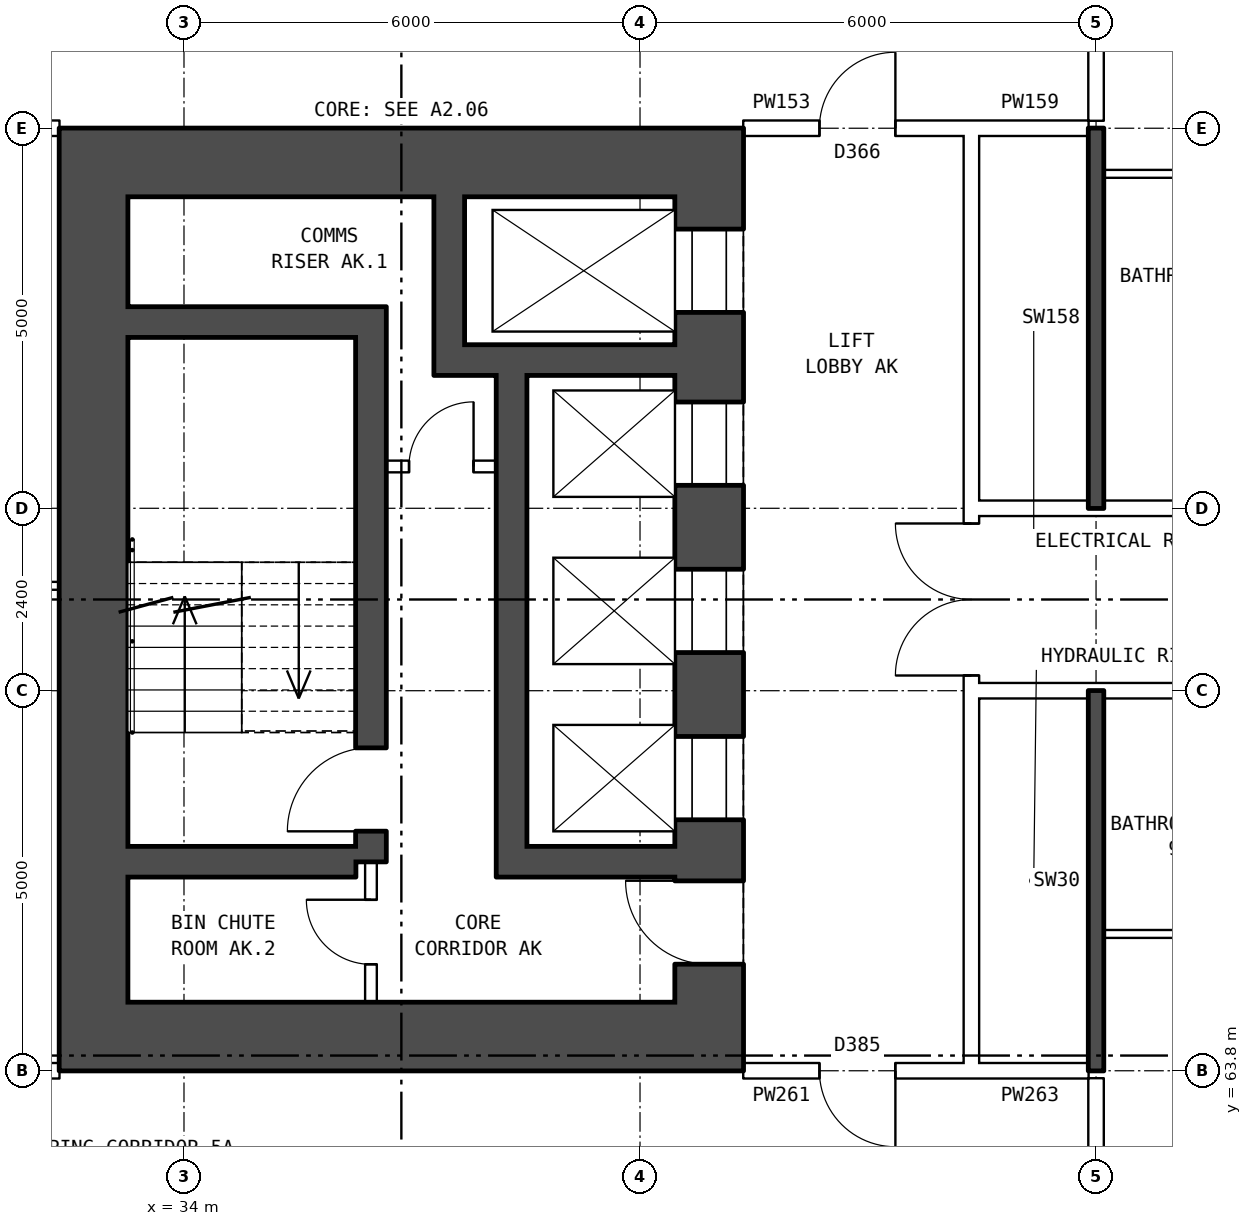
"""IFC4 building model, lengths in metres.
Left out: names, types, materials, properties, quantities, classifications, styles, units other than length and angle.
Written with IfcOpenShell. Run it as: python <this file> out.ifc"""

import sys

from ifc_helpers import new_model, si_unit, direction, frame, frame_2d, origin, place, context, subcontext, project, spatial, rectangle, extrude, element, fill, save


model = new_model("IFC4")
c1 = context("Model", 3, precision=1e-05, world=origin(), true_north=direction((0.0, 1.0)))
c2 = subcontext(c1, "Body", "Model", "MODEL_VIEW")
j1 = project(units=[si_unit("LENGTHUNIT", "METRE"), si_unit("PLANEANGLEUNIT", "RADIAN")], contexts=[c1])
p1 = place(None, origin())
s1 = spatial("IfcSite", under=j1, at=p1, CompositionType="ELEMENT")
p2 = place(p1, origin())
s2 = spatial("IfcBuilding", under=s1, at=p2, CompositionType="ELEMENT")
p3 = place(p2, frame((0.0, 0.0, 22.6)))
s3 = spatial("IfcBuildingStorey", under=s2, at=p3, CompositionType="ELEMENT", Elevation=22.6)
p4 = place(p3, frame((40.91, 75.3, 0.0), z_axis=(0.0, 0.0, 1.0), x_axis=(0.0, -1.0, 0.0)))
e1 = element("IfcWall", 1, at=p4, inside=s3, PredefinedType="SHEAR", context=c2, shape_type="SweptSolid", body=[
    extrude(rectangle(XDim=10.6, YDim=0.9, at=frame_2d((5.3, 0.0))), origin(), (0.0, 0.0, 1.0), 2.85),
])
p5 = place(p4, frame((0.425, 0.0, 0.0)))
e2 = element("IfcOpeningElement", 2, at=p5, cuts=e1, PredefinedType="OPENING", context=c2, shape_type="SweptSolid", body=[
    extrude(rectangle(XDim=1.1, YDim=2.1, at=frame_2d((0.55, 1.05))), frame((0.0, 0.46, 0.0), z_axis=(0.0, -1.0, 0.0), x_axis=(1.0, 0.0, 0.0)), (0.0, 0.0, 1.0), 0.92),
])
p6 = place(p4, frame((2.7, 0.0, 0.0)))
e3 = element("IfcOpeningElement", 3, at=p6, cuts=e1, PredefinedType="OPENING", context=c2, shape_type="SweptSolid", body=[
    extrude(rectangle(XDim=1.1, YDim=2.1, at=frame_2d((0.55, 1.05))), frame((0.0, 0.46, 0.0), z_axis=(0.0, -1.0, 0.0), x_axis=(1.0, 0.0, 0.0)), (0.0, 0.0, 1.0), 0.92),
])
p7 = place(p4, frame((4.9, 0.0, 0.0)))
e4 = element("IfcOpeningElement", 4, at=p7, cuts=e1, PredefinedType="OPENING", context=c2, shape_type="SweptSolid", body=[
    extrude(rectangle(XDim=1.1, YDim=2.1, at=frame_2d((0.55, 1.05))), frame((0.0, 0.46, 0.0), z_axis=(0.0, -1.0, 0.0), x_axis=(1.0, 0.0, 0.0)), (0.0, 0.0, 1.0), 0.92),
])
p8 = place(p4, frame((7.1, 0.0, 0.0)))
e5 = element("IfcOpeningElement", 5, at=p8, cuts=e1, PredefinedType="OPENING", context=c2, shape_type="SweptSolid", body=[
    extrude(rectangle(XDim=1.1, YDim=2.1, at=frame_2d((0.55, 1.05))), frame((0.0, 0.46, 0.0), z_axis=(0.0, -1.0, 0.0), x_axis=(1.0, 0.0, 0.0)), (0.0, 0.0, 1.0), 0.92),
])
p9 = place(p4, frame((9.0, 0.0, 0.0)))
e6 = element("IfcOpeningElement", 6, at=p9, cuts=e1, PredefinedType="OPENING", context=c2, shape_type="SweptSolid", body=[
    extrude(rectangle(XDim=1.1, YDim=2.1, at=frame_2d((0.55, 1.05))), frame((0.0, 0.46, 0.0), z_axis=(0.0, -1.0, 0.0), x_axis=(1.0, 0.0, 0.0)), (0.0, 0.0, 1.0), 0.92),
])
p10 = place(p3, frame((32.81, 75.3, 0.0), z_axis=(0.0, 0.0, 1.0), x_axis=(0.0, -1.0, 0.0)))
e7 = element("IfcWall", 7, at=p10, inside=s3, PredefinedType="SHEAR", context=c2, shape_type="SweptSolid", body=[
    extrude(rectangle(XDim=10.6, YDim=0.9, at=frame_2d((5.3, 0.0))), origin(), (0.0, 0.0, 1.0), 2.85),
])
for number, where, z_axis, x_axis in (
    (8, (41.36, 75.75, 0.0), (0.0, 0.0, 1.0), (-1.0, 0.0, 0.0)),
    (9, (41.36, 64.25, 0.0), (0.0, 0.0, 1.0), (-1.0, 0.0, 0.0)),
):
    element("IfcWall", number, at=place(p3, frame(where, z_axis=z_axis, x_axis=x_axis)), inside=s3, PredefinedType="SHEAR", context=c2, shape_type="SweptSolid", body=[
        extrude(rectangle(XDim=9.0, YDim=0.9, at=frame_2d((4.5, 0.0))), origin(), (0.0, 0.0, 1.0), 2.85),
    ])
p11 = place(p3, frame((36.26, 73.65, 0.0), z_axis=(0.0, 0.0, 1.0), x_axis=(-1.0, 0.0, 0.0)))
e10 = element("IfcWall", 10, at=p11, inside=s3, PredefinedType="SHEAR", context=c2, shape_type="SweptSolid", body=[
    extrude(rectangle(XDim=3.0, YDim=0.4, at=frame_2d((1.5, 0.0))), origin(), (0.0, 0.0, 1.0), 2.85),
])
p12 = place(p3, frame((40.46, 73.15, 0.0), z_axis=(0.0, 0.0, 1.0), x_axis=(-1.0, 0.0, 0.0)))
e11 = element("IfcWall", 11, at=p12, inside=s3, PredefinedType="SHEAR", context=c2, shape_type="SweptSolid", body=[
    extrude(rectangle(XDim=3.17, YDim=0.4, at=frame_2d((1.585, 0.0))), origin(), (0.0, 0.0, 1.0), 2.85),
])
p13 = place(p3, frame((38.11, 71.75, 0.0), z_axis=(0.0, 0.0, 1.0), x_axis=(-1.0, 0.0, 0.0)))
e12 = element("IfcWall", 12, at=p13, inside=s3, PredefinedType="PARTITIONING", context=c2, shape_type="SweptSolid", body=[
    extrude(rectangle(XDim=1.45, YDim=0.15, at=frame_2d((0.725, 0.0))), origin(), (0.0, 0.0, 1.0), 2.85),
])
p14 = place(p13, frame((0.3, 0.0, 0.0)))
e13 = element("IfcOpeningElement", 13, at=p14, cuts=e12, PredefinedType="OPENING", context=c2, shape_type="SweptSolid", body=[
    extrude(rectangle(XDim=0.85, YDim=2.1, at=frame_2d((0.425, 1.05))), frame((0.0, 0.085, 0.0), z_axis=(0.0, -1.0, 0.0), x_axis=(1.0, 0.0, 0.0)), (0.0, 0.0, 1.0), 0.17),
])
p15 = place(p3, frame((40.46, 66.55, 0.0), z_axis=(0.0, 0.0, 1.0), x_axis=(-1.0, 0.0, 0.0)))
e14 = element("IfcWall", 14, at=p15, inside=s3, PredefinedType="SHEAR", context=c2, shape_type="SweptSolid", body=[
    extrude(rectangle(XDim=1.95, YDim=0.4, at=frame_2d((0.975, 0.0))), origin(), (0.0, 0.0, 1.0), 2.85),
])
p16 = place(p3, frame((36.26, 66.55, 0.0), z_axis=(0.0, 0.0, 1.0), x_axis=(-1.0, 0.0, 0.0)))
e15 = element("IfcWall", 15, at=p16, inside=s3, PredefinedType="SHEAR", context=c2, shape_type="SweptSolid", body=[
    extrude(rectangle(XDim=3.0, YDim=0.4, at=frame_2d((1.5, 0.0))), origin(), (0.0, 0.0, 1.0), 2.85),
])
p17 = place(p3, frame((38.31, 72.95, 0.0), z_axis=(0.0, 0.0, 1.0), x_axis=(0.0, -1.0, 0.0)))
e16 = element("IfcWall", 16, at=p17, inside=s3, PredefinedType="SHEAR", context=c2, shape_type="SweptSolid", body=[
    extrude(rectangle(XDim=6.6, YDim=0.4, at=frame_2d((3.3, 0.0))), origin(), (0.0, 0.0, 1.0), 2.85),
])
p18 = place(p3, frame((37.49, 75.3, 0.0), z_axis=(0.0, 0.0, 1.0), x_axis=(0.0, -1.0, 0.0)))
e17 = element("IfcWall", 17, at=p18, inside=s3, PredefinedType="SHEAR", context=c2, shape_type="SweptSolid", body=[
    extrude(rectangle(XDim=1.95, YDim=0.4, at=frame_2d((0.975, 0.0))), origin(), (0.0, 0.0, 1.0), 2.85),
])
p19 = place(p3, frame((36.46, 73.85, 0.0), z_axis=(0.0, 0.0, 1.0), x_axis=(0.0, -1.0, 0.0)))
e18 = element("IfcWall", 18, at=p19, inside=s3, PredefinedType="SHEAR", context=c2, shape_type="SweptSolid", body=[
    extrude(rectangle(XDim=7.3, YDim=0.4, at=frame_2d((3.65, 0.0))), origin(), (0.0, 0.0, 1.0), 2.85),
])
p20 = place(p19, frame((5.8, 0.0, 0.0)))
e19 = element("IfcOpeningElement", 19, at=p20, cuts=e18, PredefinedType="OPENING", context=c2, shape_type="SweptSolid", body=[
    extrude(rectangle(XDim=1.1, YDim=2.1, at=frame_2d((0.55, 1.05))), frame((0.0, 0.21, 0.0), z_axis=(0.0, -1.0, 0.0), x_axis=(1.0, 0.0, 0.0)), (0.0, 0.0, 1.0), 0.42),
])
p21 = place(p3, frame((36.46, 66.55, 0.0), z_axis=(0.0, 0.0, 1.0), x_axis=(0.0, -1.0, 0.0)))
e20 = element("IfcWall", 20, at=p21, inside=s3, PredefinedType="PARTITIONING", context=c2, shape_type="SweptSolid", body=[
    extrude(rectangle(XDim=1.85, YDim=0.15, at=frame_2d((0.925, 0.0))), origin(), (0.0, 0.0, 1.0), 2.85),
])
p22 = place(p21, frame((0.5, 0.0, 0.0)))
e21 = element("IfcOpeningElement", 21, at=p22, cuts=e20, PredefinedType="OPENING", context=c2, shape_type="SweptSolid", body=[
    extrude(rectangle(XDim=0.85, YDim=2.1, at=frame_2d((0.425, 1.05))), frame((0.0, 0.085, 0.0), z_axis=(0.0, -1.0, 0.0), x_axis=(1.0, 0.0, 0.0)), (0.0, 0.0, 1.0), 0.17),
])
p23 = place(p3, frame((44.36, 63.9, 0.0), z_axis=(0.0, 0.0, 1.0), x_axis=(0.0, 1.0, 0.0)))
e22 = element("IfcWall", 22, at=p23, inside=s3, PredefinedType="PARTITIONING", context=c2, shape_type="SweptSolid", body=[
    extrude(rectangle(XDim=12.2, YDim=0.2, at=frame_2d((6.1, 0.0))), origin(), (0.0, 0.0, 1.0), 2.85),
])
p24 = place(p23, frame((5.1, 0.0, 0.0)))
e23 = element("IfcOpeningElement", 23, at=p24, cuts=e22, PredefinedType="OPENING", context=c2, shape_type="SweptSolid", body=[
    extrude(rectangle(XDim=2.0, YDim=2.1, at=frame_2d((1.0, 1.05))), frame((0.0, 0.11, 0.0), z_axis=(0.0, -1.0, 0.0), x_axis=(1.0, 0.0, 0.0)), (0.0, 0.0, 1.0), 0.22),
])
p25 = place(p3, frame((22.51, 63.8, 0.0), z_axis=(0.0, 0.0, 1.0), x_axis=(1.0, 0.0, 0.0)))
e24 = element("IfcWall", 24, at=p25, inside=s3, PredefinedType="PARTITIONING", context=c2, shape_type="SweptSolid", body=[
    extrude(rectangle(XDim=9.85, YDim=0.2, at=frame_2d((4.925, 0.0))), origin(), (0.0, 0.0, 1.0), 2.85),
])
p26 = place(p25, frame((7.27, 0.0, 0.0)))
e25 = element("IfcOpeningElement", 25, at=p26, cuts=e24, PredefinedType="OPENING", context=c2, shape_type="SweptSolid", body=[
    extrude(rectangle(XDim=0.8, YDim=2.1, at=frame_2d((0.4, 1.05))), frame((0.0, 0.11, 0.0), z_axis=(0.0, -1.0, 0.0), x_axis=(1.0, 0.0, 0.0)), (0.0, 0.0, 1.0), 0.22),
])
p27 = place(p3, frame((41.36, 63.8, 0.0), z_axis=(0.0, 0.0, 1.0), x_axis=(1.0, 0.0, 0.0)))
e26 = element("IfcWall", 26, at=p27, inside=s3, PredefinedType="PARTITIONING", context=c2, shape_type="SweptSolid", body=[
    extrude(rectangle(XDim=3.0, YDim=0.2, at=frame_2d((1.5, 0.0))), origin(), (0.0, 0.0, 1.0), 2.85),
])
p28 = place(p27, frame((1.0, 0.0, 0.0)))
e27 = element("IfcOpeningElement", 27, at=p28, cuts=e26, PredefinedType="OPENING", context=c2, shape_type="SweptSolid", body=[
    extrude(rectangle(XDim=1.0, YDim=2.1, at=frame_2d((0.5, 1.05))), frame((0.0, 0.11, 0.0), z_axis=(0.0, -1.0, 0.0), x_axis=(1.0, 0.0, 0.0)), (0.0, 0.0, 1.0), 0.22),
])
p29 = place(p3, frame((44.36, 63.8, 0.0), z_axis=(0.0, 0.0, 1.0), x_axis=(1.0, 0.0, 0.0)))
e28 = element("IfcWall", 28, at=p29, inside=s3, PredefinedType="PARTITIONING", context=c2, shape_type="SweptSolid", body=[
    extrude(rectangle(XDim=1.54, YDim=0.2, at=frame_2d((0.77, 0.0))), origin(), (0.0, 0.0, 1.0), 2.85),
])
p30 = place(p3, frame((46.1, 65.6, 0.0), z_axis=(0.0, 0.0, 1.0), x_axis=(1.0, 0.0, 0.0)))
e29 = element("IfcWall", 29, at=p30, inside=s3, PredefinedType="PARTITIONING", context=c2, shape_type="SweptSolid", body=[
    extrude(rectangle(XDim=2.9, YDim=0.1, at=frame_2d((1.45, 0.0))), origin(), (0.0, 0.0, 1.0), 2.85),
])
p31 = place(p3, frame((44.36, 68.8, 0.0), z_axis=(0.0, 0.0, 1.0), x_axis=(1.0, 0.0, 0.0)))
e30 = element("IfcWall", 30, at=p31, inside=s3, PredefinedType="PARTITIONING", context=c2, shape_type="SweptSolid", body=[
    extrude(rectangle(XDim=19.28, YDim=0.2, at=frame_2d((9.64, 0.0))), origin(), (0.0, 0.0, 1.0), 2.85),
])
p32 = place(p31, frame((14.64, 0.0, 0.0)))
e31 = element("IfcOpeningElement", 31, at=p32, cuts=e30, PredefinedType="OPENING", context=c2, shape_type="SweptSolid", body=[
    extrude(rectangle(XDim=1.0, YDim=2.1, at=frame_2d((0.5, 1.05))), frame((0.0, 0.11, 0.0), z_axis=(0.0, -1.0, 0.0), x_axis=(1.0, 0.0, 0.0)), (0.0, 0.0, 1.0), 0.22),
])
p33 = place(p31, frame((5.64, 0.0, 0.0)))
e32 = element("IfcOpeningElement", 32, at=p33, cuts=e30, PredefinedType="OPENING", context=c2, shape_type="SweptSolid", body=[
    extrude(rectangle(XDim=1.0, YDim=2.1, at=frame_2d((0.5, 1.05))), frame((0.0, 0.11, 0.0), z_axis=(0.0, -1.0, 0.0), x_axis=(1.0, 0.0, 0.0)), (0.0, 0.0, 1.0), 0.22),
])
p34 = place(p3, frame((28.1, 70.18, 0.0), z_axis=(0.0, 0.0, 1.0), x_axis=(1.0, 0.0, 0.0)))
e33 = element("IfcWall", 33, at=p34, inside=s3, PredefinedType="PARTITIONING", context=c2, shape_type="SweptSolid", body=[
    extrude(rectangle(XDim=4.26, YDim=0.1, at=frame_2d((2.13, 0.0))), origin(), (0.0, 0.0, 1.0), 2.85),
])
p35 = place(p3, frame((44.36, 71.2, 0.0), z_axis=(0.0, 0.0, 1.0), x_axis=(1.0, 0.0, 0.0)))
e34 = element("IfcWall", 34, at=p35, inside=s3, PredefinedType="PARTITIONING", context=c2, shape_type="SweptSolid", body=[
    extrude(rectangle(XDim=19.28, YDim=0.2, at=frame_2d((9.64, 0.0))), origin(), (0.0, 0.0, 1.0), 2.85),
])
p36 = place(p35, frame((14.64, 0.0, 0.0)))
e35 = element("IfcOpeningElement", 35, at=p36, cuts=e34, PredefinedType="OPENING", context=c2, shape_type="SweptSolid", body=[
    extrude(rectangle(XDim=1.0, YDim=2.1, at=frame_2d((0.5, 1.05))), frame((0.0, 0.11, 0.0), z_axis=(0.0, -1.0, 0.0), x_axis=(1.0, 0.0, 0.0)), (0.0, 0.0, 1.0), 0.22),
])
p37 = place(p35, frame((5.64, 0.0, 0.0)))
e36 = element("IfcOpeningElement", 36, at=p37, cuts=e34, PredefinedType="OPENING", context=c2, shape_type="SweptSolid", body=[
    extrude(rectangle(XDim=1.0, YDim=2.1, at=frame_2d((0.5, 1.05))), frame((0.0, 0.11, 0.0), z_axis=(0.0, -1.0, 0.0), x_axis=(1.0, 0.0, 0.0)), (0.0, 0.0, 1.0), 0.22),
])
p38 = place(p3, frame((46.1, 75.6, 0.0), z_axis=(0.0, 0.0, 1.0), x_axis=(1.0, 0.0, 0.0)))
e37 = element("IfcWall", 37, at=p38, inside=s3, PredefinedType="PARTITIONING", context=c2, shape_type="SweptSolid", body=[
    extrude(rectangle(XDim=2.9, YDim=0.1, at=frame_2d((1.45, 0.0))), origin(), (0.0, 0.0, 1.0), 2.85),
])
p39 = place(p3, frame((22.51, 76.2, 0.0), z_axis=(0.0, 0.0, 1.0), x_axis=(1.0, 0.0, 0.0)))
e38 = element("IfcWall", 38, at=p39, inside=s3, PredefinedType="PARTITIONING", context=c2, shape_type="SweptSolid", body=[
    extrude(rectangle(XDim=9.85, YDim=0.2, at=frame_2d((4.925, 0.0))), origin(), (0.0, 0.0, 1.0), 2.85),
])
p40 = place(p39, frame((7.27, 0.0, 0.0)))
e39 = element("IfcOpeningElement", 39, at=p40, cuts=e38, PredefinedType="OPENING", context=c2, shape_type="SweptSolid", body=[
    extrude(rectangle(XDim=0.8, YDim=2.1, at=frame_2d((0.4, 1.05))), frame((0.0, 0.11, 0.0), z_axis=(0.0, -1.0, 0.0), x_axis=(1.0, 0.0, 0.0)), (0.0, 0.0, 1.0), 0.22),
])
p41 = place(p3, frame((41.36, 76.2, 0.0), z_axis=(0.0, 0.0, 1.0), x_axis=(1.0, 0.0, 0.0)))
e40 = element("IfcWall", 40, at=p41, inside=s3, PredefinedType="PARTITIONING", context=c2, shape_type="SweptSolid", body=[
    extrude(rectangle(XDim=3.0, YDim=0.2, at=frame_2d((1.5, 0.0))), origin(), (0.0, 0.0, 1.0), 2.85),
])
p42 = place(p41, frame((1.0, 0.0, 0.0)))
e41 = element("IfcOpeningElement", 41, at=p42, cuts=e40, PredefinedType="OPENING", context=c2, shape_type="SweptSolid", body=[
    extrude(rectangle(XDim=1.0, YDim=2.1, at=frame_2d((0.5, 1.05))), frame((0.0, 0.11, 0.0), z_axis=(0.0, -1.0, 0.0), x_axis=(1.0, 0.0, 0.0)), (0.0, 0.0, 1.0), 0.22),
])
p43 = place(p3, frame((44.36, 76.2, 0.0), z_axis=(0.0, 0.0, 1.0), x_axis=(1.0, 0.0, 0.0)))
e42 = element("IfcWall", 42, at=p43, inside=s3, PredefinedType="PARTITIONING", context=c2, shape_type="SweptSolid", body=[
    extrude(rectangle(XDim=1.54, YDim=0.2, at=frame_2d((0.77, 0.0))), origin(), (0.0, 0.0, 1.0), 2.85),
])
p44 = place(p3, frame((46.0, 61.5, 0.0), z_axis=(0.0, 0.0, 1.0), x_axis=(0.0, 1.0, 0.0)))
e43 = element("IfcWall", 43, at=p44, inside=s3, PredefinedType="PARTITIONING", context=c2, shape_type="SweptSolid", body=[
    extrude(rectangle(XDim=2.2, YDim=0.2, at=frame_2d((1.1, 0.0))), origin(), (0.0, 0.0, 1.0), 2.85),
])
for number, where, z_axis, x_axis in (
    (44, (46.0, 63.8, 0.0), (0.0, 0.0, 1.0), (0.0, 1.0, 0.0)),
    (45, (46.0, 71.2, 0.0), (0.0, 0.0, 1.0), (0.0, 1.0, 0.0)),
):
    element("IfcWall", number, at=place(p3, frame(where, z_axis=z_axis, x_axis=x_axis)), inside=s3, PredefinedType="SOLIDWALL", context=c2, shape_type="SweptSolid", body=[
        extrude(rectangle(XDim=5.0, YDim=0.2, at=frame_2d((2.5, 0.0))), origin(), (0.0, 0.0, 1.0), 2.85),
    ])
p45 = place(p3, frame((46.0, 76.3, 0.0), z_axis=(0.0, 0.0, 1.0), x_axis=(0.0, 1.0, 0.0)))
e46 = element("IfcWall", 46, at=p45, inside=s3, PredefinedType="PARTITIONING", context=c2, shape_type="SweptSolid", body=[
    extrude(rectangle(XDim=2.2, YDim=0.2, at=frame_2d((1.1, 0.0))), origin(), (0.0, 0.0, 1.0), 2.85),
])
p46 = place(p5, origin())
e47 = element("IfcDoor", 47, at=p46, inside=s3, OperationType="DOUBLE_DOOR_SLIDING", PredefinedType="DOOR", context=c2, shape_type="SweptSolid", body=[
    extrude(rectangle(XDim=1.1, YDim=2.1, at=frame_2d((0.55, 1.05))), frame((0.0, -0.385, 0.0), z_axis=(0.0, -1.0, 0.0), x_axis=(1.0, 0.0, 0.0)), (0.0, 0.0, 1.0), 0.05),
])
fill(e2, e47)
p47 = place(p6, origin())
e48 = element("IfcDoor", 48, at=p47, inside=s3, OperationType="DOUBLE_DOOR_SLIDING", PredefinedType="DOOR", context=c2, shape_type="SweptSolid", body=[
    extrude(rectangle(XDim=1.1, YDim=2.1, at=frame_2d((0.55, 1.05))), frame((0.0, -0.385, 0.0), z_axis=(0.0, -1.0, 0.0), x_axis=(1.0, 0.0, 0.0)), (0.0, 0.0, 1.0), 0.05),
])
fill(e3, e48)
p48 = place(p7, origin())
e49 = element("IfcDoor", 49, at=p48, inside=s3, OperationType="DOUBLE_DOOR_SLIDING", PredefinedType="DOOR", context=c2, shape_type="SweptSolid", body=[
    extrude(rectangle(XDim=1.1, YDim=2.1, at=frame_2d((0.55, 1.05))), frame((0.0, -0.385, 0.0), z_axis=(0.0, -1.0, 0.0), x_axis=(1.0, 0.0, 0.0)), (0.0, 0.0, 1.0), 0.05),
])
fill(e4, e49)
p49 = place(p8, origin())
e50 = element("IfcDoor", 50, at=p49, inside=s3, OperationType="DOUBLE_DOOR_SLIDING", PredefinedType="DOOR", context=c2, shape_type="SweptSolid", body=[
    extrude(rectangle(XDim=1.1, YDim=2.1, at=frame_2d((0.55, 1.05))), frame((0.0, -0.385, 0.0), z_axis=(0.0, -1.0, 0.0), x_axis=(1.0, 0.0, 0.0)), (0.0, 0.0, 1.0), 0.05),
])
fill(e5, e50)
p50 = place(p9, frame((1.1, 0.0, 0.0), z_axis=(0.0, 0.0, 1.0), x_axis=(-1.0, 0.0, 0.0)))
e51 = element("IfcDoor", 51, at=p50, inside=s3, OperationType="SINGLE_SWING_RIGHT", PredefinedType="DOOR", context=c2, shape_type="SweptSolid", body=[
    extrude(rectangle(XDim=1.1, YDim=2.1, at=frame_2d((0.55, 1.05))), frame((0.0, 0.435, 0.0), z_axis=(0.0, -1.0, 0.0), x_axis=(1.0, 0.0, 0.0)), (0.0, 0.0, 1.0), 0.05),
])
fill(e6, e51)
p51 = place(p20, frame((1.1, 0.0, 0.0), z_axis=(0.0, 0.0, 1.0), x_axis=(-1.0, 0.0, 0.0)))
e52 = element("IfcDoor", 52, at=p51, inside=s3, OperationType="SINGLE_SWING_LEFT", PredefinedType="DOOR", context=c2, shape_type="SweptSolid", body=[
    extrude(rectangle(XDim=1.1, YDim=2.1, at=frame_2d((0.55, 1.05))), frame((0.0, 0.025, 0.0), z_axis=(0.0, -1.0, 0.0), x_axis=(1.0, 0.0, 0.0)), (0.0, 0.0, 1.0), 0.05),
])
fill(e19, e52)
p52 = place(p14, frame((0.85, 0.0, 0.0), z_axis=(0.0, 0.0, 1.0), x_axis=(-1.0, 0.0, 0.0)))
e53 = element("IfcDoor", 53, at=p52, inside=s3, OperationType="SINGLE_SWING_RIGHT", PredefinedType="DOOR", context=c2, shape_type="SweptSolid", body=[
    extrude(rectangle(XDim=0.85, YDim=2.1, at=frame_2d((0.425, 1.05))), frame((0.0, 0.025, 0.0), z_axis=(0.0, -1.0, 0.0), x_axis=(1.0, 0.0, 0.0)), (0.0, 0.0, 1.0), 0.05),
])
fill(e13, e53)
p53 = place(p22, frame((0.85, 0.0, 0.0), z_axis=(0.0, 0.0, 1.0), x_axis=(-1.0, 0.0, 0.0)))
e54 = element("IfcDoor", 54, at=p53, inside=s3, OperationType="SINGLE_SWING_RIGHT", PredefinedType="DOOR", context=c2, shape_type="SweptSolid", body=[
    extrude(rectangle(XDim=0.85, YDim=2.1, at=frame_2d((0.425, 1.05))), frame((0.0, 0.025, 0.0), z_axis=(0.0, -1.0, 0.0), x_axis=(1.0, 0.0, 0.0)), (0.0, 0.0, 1.0), 0.05),
])
fill(e21, e54)
p54 = place(p24, origin())
e55 = element("IfcDoor", 55, at=p54, inside=s3, OperationType="DOUBLE_DOOR_SINGLE_SWING", PredefinedType="DOOR", context=c2, shape_type="SweptSolid", body=[
    extrude(rectangle(XDim=2.0, YDim=2.1, at=frame_2d((1.0, 1.05))), frame((0.0, 0.025, 0.0), z_axis=(0.0, -1.0, 0.0), x_axis=(1.0, 0.0, 0.0)), (0.0, 0.0, 1.0), 0.05),
])
fill(e23, e55)
p55 = place(p28, frame((1.0, 0.0, 0.0), z_axis=(0.0, 0.0, 1.0), x_axis=(-1.0, 0.0, 0.0)))
e56 = element("IfcDoor", 56, at=p55, inside=s3, OperationType="SINGLE_SWING_LEFT", PredefinedType="DOOR", context=c2, shape_type="SweptSolid", body=[
    extrude(rectangle(XDim=1.0, YDim=2.1, at=frame_2d((0.5, 1.05))), frame((0.0, 0.025, 0.0), z_axis=(0.0, -1.0, 0.0), x_axis=(1.0, 0.0, 0.0)), (0.0, 0.0, 1.0), 0.05),
])
fill(e27, e56)
p56 = place(p42, origin())
e57 = element("IfcDoor", 57, at=p56, inside=s3, OperationType="SINGLE_SWING_RIGHT", PredefinedType="DOOR", context=c2, shape_type="SweptSolid", body=[
    extrude(rectangle(XDim=1.0, YDim=2.1, at=frame_2d((0.5, 1.05))), frame((0.0, 0.025, 0.0), z_axis=(0.0, -1.0, 0.0), x_axis=(1.0, 0.0, 0.0)), (0.0, 0.0, 1.0), 0.05),
])
fill(e41, e57)
save(model, sys.argv[1])
